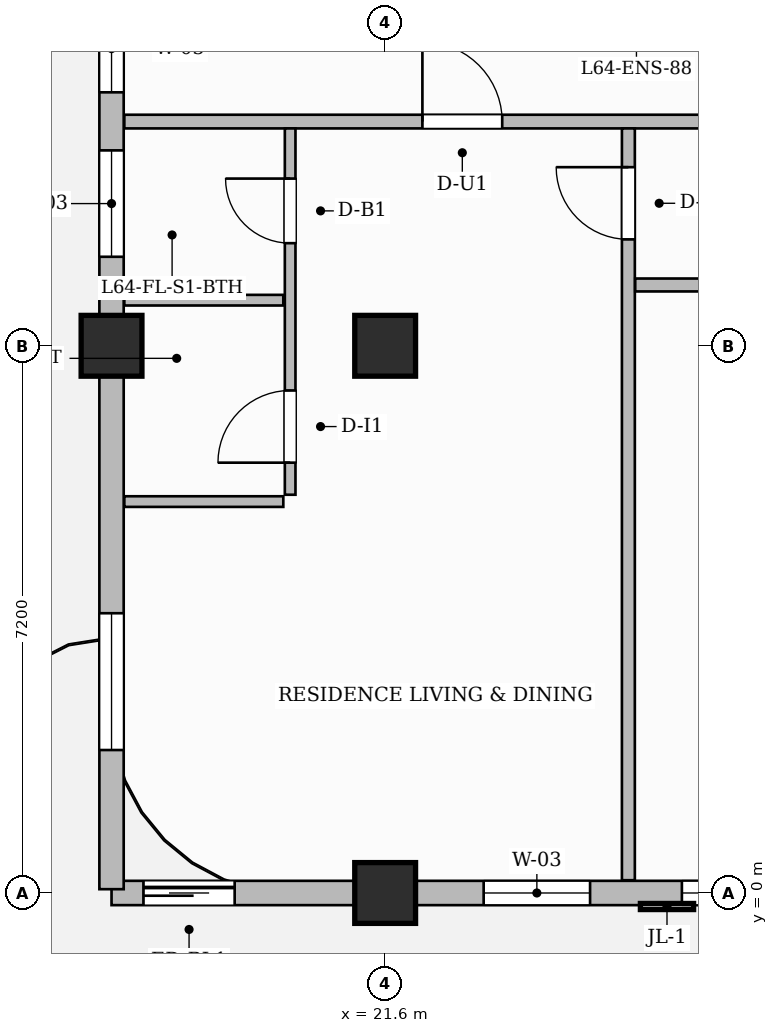
"""IFC4 building model, lengths in metres.
Left out: names, types, materials, properties, quantities, classifications, styles, units other than length and angle.
Written with IfcOpenShell. Run it as: python <this file> out.ifc"""

import sys

from ifc_helpers import new_model, si_unit, direction, frame, frame_2d, origin, origin_2d, place, context, subcontext, project, spatial, rectangle, extrude, source, transform, mapped, element, fill, save


model = new_model("IFC4")
c1 = context("Model", 3, precision=1e-05, world=origin(), true_north=direction((0.0, 1.0)))
c2 = subcontext(c1, "Body", "Model", "MODEL_VIEW")
j1 = project(units=[si_unit("LENGTHUNIT", "METRE"), si_unit("PLANEANGLEUNIT", "RADIAN")], contexts=[c1])
p1 = place(None, origin())
s1 = spatial("IfcSite", under=j1, at=p1, CompositionType="ELEMENT")
p2 = place(p1, origin())
s2 = spatial("IfcBuilding", under=s1, at=p2, CompositionType="ELEMENT")
p3 = place(p2, frame((0.0, 0.0, 255.8)))
s3 = spatial("IfcBuildingStorey", under=s2, at=p3, CompositionType="ELEMENT", Elevation=255.8)
m1 = source(origin(), c2, "Body", "SweptSolid", [
    extrude(rectangle(XDim=0.8, YDim=0.8, at=origin_2d()), origin(), (0.0, 0.0, 1.0), 3.85),
])
for number, where, z_axis, x_axis in (
    (1, (21.6, 0.0, 0.0), (0.0, 0.0, 1.0), (1.0, 0.0, 0.0)),
    (2, (21.6, 7.2, 0.0), (0.0, 0.0, 1.0), (1.0, 0.0, 0.0)),
    (3, (18.0, 7.2, 0.0), (0.0, 0.0, 1.0), (1.0, 0.0, 0.0)),
):
    element("IfcColumn", number, at=place(p3, frame(where, z_axis=z_axis, x_axis=x_axis)), inside=s3, PredefinedType="COLUMN", context=c2, shape_type="MappedRepresentation", body=[
        mapped(m1, transform((0.0, 0.0, 0.0), scale=1.0)),
    ])
p4 = place(p3, frame((18.168, 10.15, 0.0), z_axis=(0.0, 0.0, 1.0), x_axis=(1.0, 0.0, 0.0)))
e4 = element("IfcWall", 4, at=p4, inside=s3, PredefinedType="PARTITIONING", context=c2, shape_type="SweptSolid", body=[
    extrude(rectangle(XDim=11.942, YDim=0.18, at=frame_2d((5.971, 0.0))), origin(), (0.0, 0.0, 1.0), 3.6),
])
p5 = place(p4, frame((3.922, 0.0, 0.0)))
e5 = element("IfcOpeningElement", 5, at=p5, cuts=e4, PredefinedType="OPENING", context=c2, shape_type="SweptSolid", body=[
    extrude(rectangle(XDim=1.05, YDim=2.25, at=frame_2d((0.525, 1.125))), frame((0.0, 0.1, 0.0), z_axis=(0.0, -1.0, 0.0), x_axis=(1.0, 0.0, 0.0)), (0.0, 0.0, 1.0), 0.2),
])
p6 = place(p3, frame((20.35, 5.24, 0.0), z_axis=(0.0, 0.0, 1.0), x_axis=(0.0, 1.0, 0.0)))
e6 = element("IfcWall", 6, at=p6, inside=s3, PredefinedType="PARTITIONING", context=c2, shape_type="SweptSolid", body=[
    extrude(rectangle(XDim=4.82, YDim=0.14, at=frame_2d((2.41, 0.0))), origin(), (0.0, 0.0, 1.0), 3.6),
])
p7 = place(p6, frame((0.422, 0.0, 0.0)))
e7 = element("IfcOpeningElement", 7, at=p7, cuts=e6, PredefinedType="OPENING", context=c2, shape_type="SweptSolid", body=[
    extrude(rectangle(XDim=0.95, YDim=2.15, at=frame_2d((0.475, 1.075))), frame((0.0, 0.08, 0.0), z_axis=(0.0, -1.0, 0.0), x_axis=(1.0, 0.0, 0.0)), (0.0, 0.0, 1.0), 0.16),
])
p8 = place(p6, frame((3.31, 0.0, 0.0)))
e8 = element("IfcOpeningElement", 8, at=p8, cuts=e6, PredefinedType="OPENING", context=c2, shape_type="SweptSolid", body=[
    extrude(rectangle(XDim=0.85, YDim=2.1, at=frame_2d((0.425, 1.05))), frame((0.0, 0.08, 0.0), z_axis=(0.0, -1.0, 0.0), x_axis=(1.0, 0.0, 0.0)), (0.0, 0.0, 1.0), 0.16),
])
for number, where, z_axis, x_axis in (
    (9, (18.168, 7.8, 0.0), (0.0, 0.0, 1.0), (1.0, 0.0, 0.0)),
    (10, (18.168, 5.15, 0.0), (0.0, 0.0, 1.0), (1.0, 0.0, 0.0)),
):
    element("IfcWall", number, at=place(p3, frame(where, z_axis=z_axis, x_axis=x_axis)), inside=s3, PredefinedType="PARTITIONING", context=c2, shape_type="SweptSolid", body=[
        extrude(rectangle(XDim=2.092, YDim=0.14, at=frame_2d((1.046, 0.0))), origin(), (0.0, 0.0, 1.0), 3.6),
    ])
p9 = place(p3, frame((24.8, 0.168, 0.0), z_axis=(0.0, 0.0, 1.0), x_axis=(0.0, 1.0, 0.0)))
e11 = element("IfcWall", 11, at=p9, inside=s3, PredefinedType="PARTITIONING", context=c2, shape_type="SweptSolid", body=[
    extrude(rectangle(XDim=9.892, YDim=0.17, at=frame_2d((4.946, 0.0))), origin(), (0.0, 0.0, 1.0), 3.6),
])
p10 = place(p9, frame((8.432, 0.0, 0.0)))
e12 = element("IfcOpeningElement", 12, at=p10, cuts=e11, PredefinedType="OPENING", context=c2, shape_type="SweptSolid", body=[
    extrude(rectangle(XDim=0.95, YDim=2.15, at=frame_2d((0.475, 1.075))), frame((0.0, 0.095, 0.0), z_axis=(0.0, -1.0, 0.0), x_axis=(1.0, 0.0, 0.0)), (0.0, 0.0, 1.0), 0.19),
])
p11 = place(p3, frame((24.89, 8.0, 0.0), z_axis=(0.0, 0.0, 1.0), x_axis=(1.0, 0.0, 0.0)))
e13 = element("IfcWall", 13, at=p11, inside=s3, PredefinedType="PARTITIONING", context=c2, shape_type="SweptSolid", body=[
    extrude(rectangle(XDim=5.22, YDim=0.17, at=frame_2d((2.61, 0.0))), origin(), (0.0, 0.0, 1.0), 3.6),
])
p12 = place(p11, frame((1.085, 0.0, 0.0)))
e14 = element("IfcOpeningElement", 14, at=p12, cuts=e13, PredefinedType="OPENING", context=c2, shape_type="SweptSolid", body=[
    extrude(rectangle(XDim=0.95, YDim=2.15, at=frame_2d((0.475, 1.075))), frame((0.0, 0.095, 0.0), z_axis=(0.0, -1.0, 0.0), x_axis=(1.0, 0.0, 0.0)), (0.0, 0.0, 1.0), 0.19),
])
p13 = place(p3, frame((18.0, 0.0, 0.0), z_axis=(0.0, 0.0, 1.0), x_axis=(1.0, 0.0, 0.0)))
e15 = element("IfcWall", 15, at=p13, inside=s3, PredefinedType="SOLIDWALL", context=c2, shape_type="SweptSolid", body=[
    extrude(rectangle(XDim=31.8, YDim=0.32, at=frame_2d((15.9, 0.0))), origin(), (0.0, 0.0, 1.0), 3.135),
])
p14 = place(p13, frame((0.42, 0.0, 0.0)))
e16 = element("IfcOpeningElement", 16, at=p14, cuts=e15, PredefinedType="OPENING", context=c2, shape_type="SweptSolid", body=[
    extrude(rectangle(XDim=1.2, YDim=2.2, at=frame_2d((0.6, 1.1))), frame((0.0, 0.17, 0.0), z_axis=(0.0, -1.0, 0.0), x_axis=(1.0, 0.0, 0.0)), (0.0, 0.0, 1.0), 0.34),
])
p15 = place(p13, frame((4.896, 0.0, 0.8)))
e17 = element("IfcOpeningElement", 17, at=p15, cuts=e15, PredefinedType="OPENING", context=c2, shape_type="SweptSolid", body=[
    extrude(rectangle(XDim=1.4, YDim=1.85, at=frame_2d((0.7, 0.925))), frame((0.0, 0.17, 0.0), z_axis=(0.0, -1.0, 0.0), x_axis=(1.0, 0.0, 0.0)), (0.0, 0.0, 1.0), 0.34),
])
p16 = place(p13, frame((7.504, 0.0, 0.8)))
e18 = element("IfcOpeningElement", 18, at=p16, cuts=e15, PredefinedType="OPENING", context=c2, shape_type="SweptSolid", body=[
    extrude(rectangle(XDim=1.8, YDim=1.85, at=frame_2d((0.9, 0.925))), frame((0.0, 0.17, 0.0), z_axis=(0.0, -1.0, 0.0), x_axis=(1.0, 0.0, 0.0)), (0.0, 0.0, 1.0), 0.34),
])
p17 = place(p13, frame((13.204, 0.0, 0.8)))
e19 = element("IfcOpeningElement", 19, at=p17, cuts=e15, PredefinedType="OPENING", context=c2, shape_type="SweptSolid", body=[
    extrude(rectangle(XDim=1.8, YDim=1.85, at=frame_2d((0.9, 0.925))), frame((0.0, 0.17, 0.0), z_axis=(0.0, -1.0, 0.0), x_axis=(1.0, 0.0, 0.0)), (0.0, 0.0, 1.0), 0.34),
])
p18 = place(p13, frame((18.796, 0.0, 0.8)))
e20 = element("IfcOpeningElement", 20, at=p18, cuts=e15, PredefinedType="OPENING", context=c2, shape_type="SweptSolid", body=[
    extrude(rectangle(XDim=1.8, YDim=1.85, at=frame_2d((0.9, 0.925))), frame((0.0, 0.17, 0.0), z_axis=(0.0, -1.0, 0.0), x_axis=(1.0, 0.0, 0.0)), (0.0, 0.0, 1.0), 0.34),
])
p19 = place(p13, frame((22.029, 0.0, 0.8)))
e21 = element("IfcOpeningElement", 21, at=p19, cuts=e15, PredefinedType="OPENING", context=c2, shape_type="SweptSolid", body=[
    extrude(rectangle(XDim=0.95, YDim=1.75, at=frame_2d((0.475, 0.875))), frame((0.0, 0.17, 0.0), z_axis=(0.0, -1.0, 0.0), x_axis=(1.0, 0.0, 0.0)), (0.0, 0.0, 1.0), 0.34),
])
p20 = place(p13, frame((25.475, 0.0, 0.8)))
e22 = element("IfcOpeningElement", 22, at=p20, cuts=e15, PredefinedType="OPENING", context=c2, shape_type="SweptSolid", body=[
    extrude(rectangle(XDim=1.8, YDim=1.85, at=frame_2d((0.9, 0.925))), frame((0.0, 0.17, 0.0), z_axis=(0.0, -1.0, 0.0), x_axis=(1.0, 0.0, 0.0)), (0.0, 0.0, 1.0), 0.34),
])
p21 = place(p13, frame((28.525, 0.0, 0.8)))
e23 = element("IfcOpeningElement", 23, at=p21, cuts=e15, PredefinedType="OPENING", context=c2, shape_type="SweptSolid", body=[
    extrude(rectangle(XDim=1.8, YDim=1.85, at=frame_2d((0.9, 0.925))), frame((0.0, 0.17, 0.0), z_axis=(0.0, -1.0, 0.0), x_axis=(1.0, 0.0, 0.0)), (0.0, 0.0, 1.0), 0.34),
])
p22 = place(p3, frame((18.0, 0.05, 0.0), z_axis=(0.0, 0.0, 1.0), x_axis=(0.0, 1.0, 0.0)))
e24 = element("IfcWall", 24, at=p22, inside=s3, PredefinedType="SOLIDWALL", context=c2, shape_type="SweptSolid", body=[
    extrude(rectangle(XDim=21.5, YDim=0.32, at=frame_2d((10.75, 0.0))), origin(), (0.0, 0.0, 1.0), 3.6),
])
p23 = place(p22, frame((1.831, 0.0, 0.8)))
e25 = element("IfcOpeningElement", 25, at=p23, cuts=e24, PredefinedType="OPENING", context=c2, shape_type="SweptSolid", body=[
    extrude(rectangle(XDim=1.8, YDim=1.85, at=frame_2d((0.9, 0.925))), frame((0.0, 0.17, 0.0), z_axis=(0.0, -1.0, 0.0), x_axis=(1.0, 0.0, 0.0)), (0.0, 0.0, 1.0), 0.34),
])
p24 = place(p22, frame((8.321, 0.0, 0.8)))
e26 = element("IfcOpeningElement", 26, at=p24, cuts=e24, PredefinedType="OPENING", context=c2, shape_type="SweptSolid", body=[
    extrude(rectangle(XDim=1.4, YDim=1.85, at=frame_2d((0.7, 0.925))), frame((0.0, 0.17, 0.0), z_axis=(0.0, -1.0, 0.0), x_axis=(1.0, 0.0, 0.0)), (0.0, 0.0, 1.0), 0.34),
])
p25 = place(p22, frame((10.485, 0.0, 0.8)))
e27 = element("IfcOpeningElement", 27, at=p25, cuts=e24, PredefinedType="OPENING", context=c2, shape_type="SweptSolid", body=[
    extrude(rectangle(XDim=1.15, YDim=1.8, at=frame_2d((0.575, 0.9))), frame((0.0, 0.17, 0.0), z_axis=(0.0, -1.0, 0.0), x_axis=(1.0, 0.0, 0.0)), (0.0, 0.0, 1.0), 0.34),
])
p26 = place(p22, frame((12.295, 0.0, 0.8)))
e28 = element("IfcOpeningElement", 28, at=p26, cuts=e24, PredefinedType="OPENING", context=c2, shape_type="SweptSolid", body=[
    extrude(rectangle(XDim=0.95, YDim=1.75, at=frame_2d((0.475, 0.875))), frame((0.0, 0.17, 0.0), z_axis=(0.0, -1.0, 0.0), x_axis=(1.0, 0.0, 0.0)), (0.0, 0.0, 1.0), 0.34),
])
p27 = place(p22, frame((15.77, 0.0, 0.8)))
e29 = element("IfcOpeningElement", 29, at=p27, cuts=e24, PredefinedType="OPENING", context=c2, shape_type="SweptSolid", body=[
    extrude(rectangle(XDim=1.8, YDim=1.85, at=frame_2d((0.9, 0.925))), frame((0.0, 0.17, 0.0), z_axis=(0.0, -1.0, 0.0), x_axis=(1.0, 0.0, 0.0)), (0.0, 0.0, 1.0), 0.34),
])
p28 = place(p22, frame((18.71, 0.0, 0.8)))
e30 = element("IfcOpeningElement", 30, at=p28, cuts=e24, PredefinedType="OPENING", context=c2, shape_type="SweptSolid", body=[
    extrude(rectangle(XDim=1.8, YDim=1.85, at=frame_2d((0.9, 0.925))), frame((0.0, 0.17, 0.0), z_axis=(0.0, -1.0, 0.0), x_axis=(1.0, 0.0, 0.0)), (0.0, 0.0, 1.0), 0.34),
])
m2 = source(origin(), c2, "Body", "SweptSolid", [
    extrude(rectangle(XDim=0.95, YDim=2.15, at=frame_2d((0.475, 1.075))), frame((0.0, 0.025, 0.0), z_axis=(0.0, -1.0, 0.0), x_axis=(1.0, 0.0, 0.0)), (0.0, 0.0, 1.0), 0.05),
])
p29 = place(p7, origin())
e31 = element("IfcDoor", 31, at=p29, inside=s3, OperationType="SINGLE_SWING_LEFT", PredefinedType="DOOR", context=c2, shape_type="MappedRepresentation", body=[
    mapped(m2, transform((0.0, 0.0, 0.0), scale=1.0)),
])
fill(e7, e31)
m3 = source(origin(), c2, "Body", "SweptSolid", [
    extrude(rectangle(XDim=0.85, YDim=2.1, at=frame_2d((0.425, 1.05))), frame((0.0, 0.025, 0.0), z_axis=(0.0, -1.0, 0.0), x_axis=(1.0, 0.0, 0.0)), (0.0, 0.0, 1.0), 0.05),
])
p30 = place(p8, origin())
e32 = element("IfcDoor", 32, at=p30, inside=s3, OperationType="SINGLE_SWING_RIGHT", PredefinedType="DOOR", context=c2, shape_type="MappedRepresentation", body=[
    mapped(m3, transform((0.0, 0.0, 0.0), scale=1.0)),
])
fill(e8, e32)
m4 = source(origin(), c2, "Body", "SweptSolid", [
    extrude(rectangle(XDim=1.05, YDim=2.25, at=frame_2d((0.525, 1.125))), frame((0.0, 0.025, 0.0), z_axis=(0.0, -1.0, 0.0), x_axis=(1.0, 0.0, 0.0)), (0.0, 0.0, 1.0), 0.05),
])
p31 = place(p5, origin())
e33 = element("IfcDoor", 33, at=p31, inside=s3, OperationType="SINGLE_SWING_LEFT", PredefinedType="DOOR", context=c2, shape_type="MappedRepresentation", body=[
    mapped(m4, transform((0.0, 0.0, 0.0), scale=1.0)),
])
fill(e5, e33)
p32 = place(p10, origin())
e34 = element("IfcDoor", 34, at=p32, inside=s3, OperationType="SINGLE_SWING_RIGHT", PredefinedType="DOOR", context=c2, shape_type="MappedRepresentation", body=[
    mapped(m2, transform((0.0, 0.0, 0.0), scale=1.0)),
])
fill(e12, e34)
m5 = source(origin(), c2, "Body", "SweptSolid", [
    extrude(rectangle(XDim=1.2, YDim=2.2, at=frame_2d((0.6, 1.1))), frame((0.0, 0.025, 0.0), z_axis=(0.0, -1.0, 0.0), x_axis=(1.0, 0.0, 0.0)), (0.0, 0.0, 1.0), 0.05),
])
p33 = place(p14, origin())
e35 = element("IfcDoor", 35, at=p33, inside=s3, OperationType="SLIDING_TO_LEFT", PredefinedType="DOOR", context=c2, shape_type="MappedRepresentation", body=[
    mapped(m5, transform((0.0, 0.0, 0.0), scale=1.0)),
])
fill(e16, e35)
m6 = source(origin(), c2, "Body", "SweptSolid", [
    extrude(rectangle(XDim=1.4, YDim=1.85, at=frame_2d((0.7, 0.925))), frame((0.0, 0.03, 0.0), z_axis=(0.0, -1.0, 0.0), x_axis=(1.0, 0.0, 0.0)), (0.0, 0.0, 1.0), 0.06),
])
p34 = place(p15, origin())
e36 = element("IfcWindow", 36, at=p34, inside=s3, PartitioningType="SINGLE_PANEL", PredefinedType="WINDOW", context=c2, shape_type="MappedRepresentation", body=[
    mapped(m6, transform((0.0, 0.0, 0.0), scale=1.0)),
])
fill(e17, e36)
m7 = source(origin(), c2, "Body", "SweptSolid", [
    extrude(rectangle(XDim=1.8, YDim=1.85, at=frame_2d((0.9, 0.925))), frame((0.0, 0.03, 0.0), z_axis=(0.0, -1.0, 0.0), x_axis=(1.0, 0.0, 0.0)), (0.0, 0.0, 1.0), 0.06),
])
p35 = place(p16, origin())
e37 = element("IfcWindow", 37, at=p35, inside=s3, PartitioningType="DOUBLE_PANEL_VERTICAL", PredefinedType="WINDOW", context=c2, shape_type="MappedRepresentation", body=[
    mapped(m7, transform((0.0, 0.0, 0.0), scale=1.0)),
])
fill(e18, e37)
p36 = place(p23, origin())
e38 = element("IfcWindow", 38, at=p36, inside=s3, PartitioningType="DOUBLE_PANEL_VERTICAL", PredefinedType="WINDOW", context=c2, shape_type="MappedRepresentation", body=[
    mapped(m7, transform((0.0, 0.0, 0.0), scale=1.0)),
])
fill(e25, e38)
p37 = place(p24, origin())
e39 = element("IfcWindow", 39, at=p37, inside=s3, PartitioningType="SINGLE_PANEL", PredefinedType="WINDOW", context=c2, shape_type="MappedRepresentation", body=[
    mapped(m6, transform((0.0, 0.0, 0.0), scale=1.0)),
])
fill(e26, e39)
m8 = source(origin(), c2, "Body", "SweptSolid", [
    extrude(rectangle(XDim=1.15, YDim=1.8, at=frame_2d((0.575, 0.9))), frame((0.0, 0.03, 0.0), z_axis=(0.0, -1.0, 0.0), x_axis=(1.0, 0.0, 0.0)), (0.0, 0.0, 1.0), 0.06),
])
p38 = place(p25, origin())
e40 = element("IfcWindow", 40, at=p38, inside=s3, PartitioningType="SINGLE_PANEL", PredefinedType="WINDOW", context=c2, shape_type="MappedRepresentation", body=[
    mapped(m8, transform((0.0, 0.0, 0.0), scale=1.0)),
])
fill(e27, e40)
save(model, sys.argv[1])
